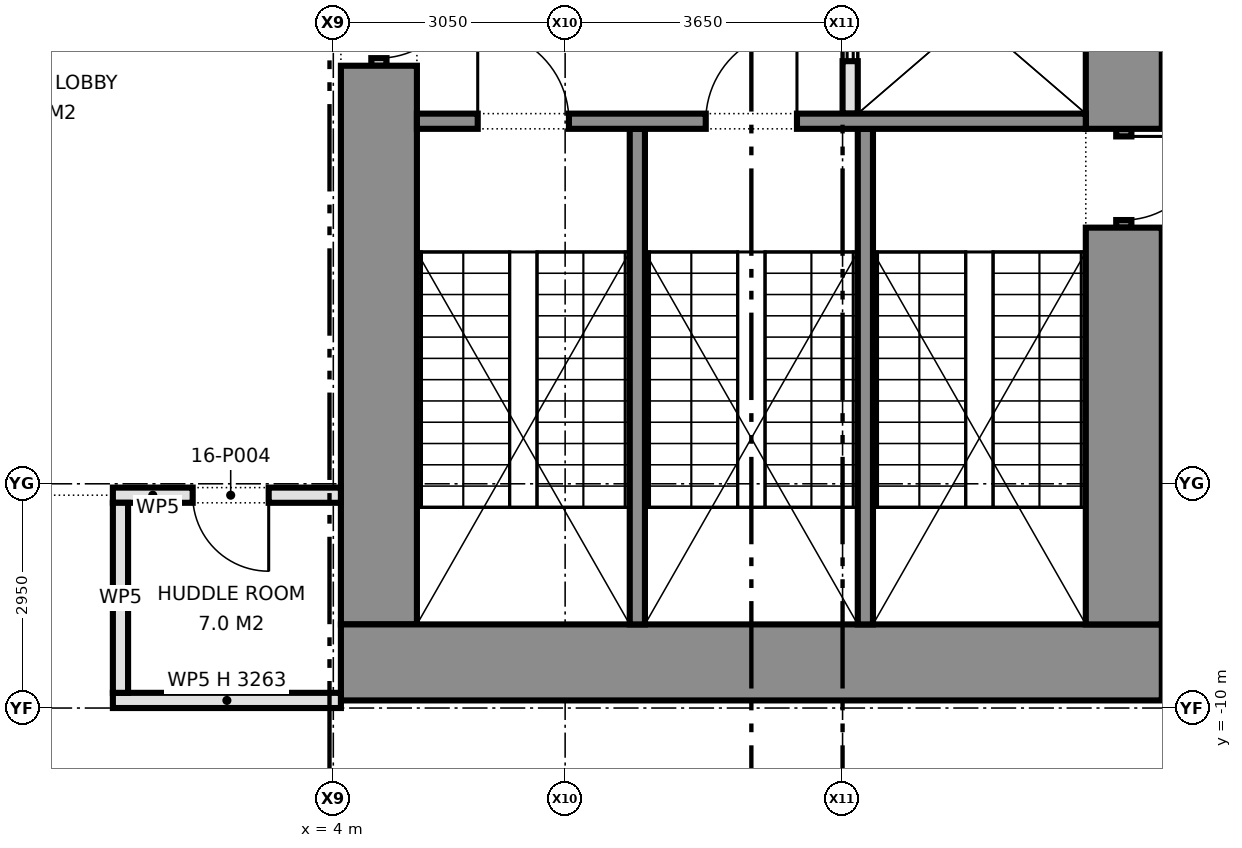
"""IFC4 building model, lengths in metres.
Left out: names, types, materials, properties, quantities, classifications, styles, units other than length and angle.
Written with IfcOpenShell. Run it as: python <this file> out.ifc"""

import sys

from ifc_helpers import new_model, si_unit, direction, frame, frame_2d, origin, place, context, subcontext, project, spatial, rectangle, extrude, element, fill, save


model = new_model("IFC4")
c1 = context("Model", 3, precision=1e-05, world=origin(), true_north=direction((0.0, 1.0)))
c2 = subcontext(c1, "Body", "Model", "MODEL_VIEW")
j1 = project(units=[si_unit("LENGTHUNIT", "METRE"), si_unit("PLANEANGLEUNIT", "RADIAN")], contexts=[c1])
p1 = place(None, origin())
s1 = spatial("IfcSite", under=j1, at=p1, CompositionType="ELEMENT")
p2 = place(p1, origin())
s2 = spatial("IfcBuilding", under=s1, at=p2, CompositionType="ELEMENT")
p3 = place(p2, frame((0.0, 0.0, 73.2)))
s3 = spatial("IfcBuildingStorey", under=s2, at=p3, CompositionType="ELEMENT", Elevation=73.2)
p4 = place(p3, frame((14.9, -9.4, 0.0), z_axis=(0.0, 0.0, 1.0), x_axis=(-1.0, 0.0, 0.0)))
e1 = element("IfcWall", 1, at=p4, inside=s3, PredefinedType="SHEAR", context=c2, shape_type="SweptSolid", body=[
    extrude(rectangle(XDim=10.8, YDim=1.0, at=frame_2d((5.4, 0.0))), origin(), (0.0, 0.0, 1.0), 4.2),
])
p5 = place(p3, frame((14.4, 3.75, 0.0), z_axis=(0.0, 0.0, 1.0), x_axis=(0.0, -1.0, 0.0)))
e2 = element("IfcWall", 2, at=p5, inside=s3, PredefinedType="SHEAR", context=c2, shape_type="SweptSolid", body=[
    extrude(rectangle(XDim=6.13, YDim=1.0, at=frame_2d((3.065, 0.0))), origin(), (0.0, 0.0, 1.0), 4.2),
])
p6 = place(p3, frame((14.4, -2.38, 0.0), z_axis=(0.0, 0.0, 1.0), x_axis=(0.0, -1.0, 0.0)))
e3 = element("IfcWall", 3, at=p6, inside=s3, PredefinedType="SHEAR", context=c2, shape_type="SweptSolid", body=[
    extrude(rectangle(XDim=1.3, YDim=0.2, at=frame_2d((0.65, 0.0))), origin(), (0.0, 0.0, 1.0), 2.4),
])
p7 = place(p6, frame((0.1, 0.0, 0.0)))
e4 = element("IfcOpeningElement", 4, at=p7, cuts=e3, PredefinedType="OPENING", context=c2, shape_type="SweptSolid", body=[
    extrude(rectangle(XDim=1.1, YDim=2.1, at=frame_2d((0.55, 1.05))), frame((0.0, 0.11, 0.0), z_axis=(0.0, -1.0, 0.0), x_axis=(1.0, 0.0, 0.0)), (0.0, 0.0, 1.0), 0.22),
])
p8 = place(p3, frame((14.4, -3.68, 0.0), z_axis=(0.0, 0.0, 1.0), x_axis=(0.0, -1.0, 0.0)))
e5 = element("IfcWall", 5, at=p8, inside=s3, PredefinedType="SHEAR", context=c2, shape_type="SweptSolid", body=[
    extrude(rectangle(XDim=5.22, YDim=1.0, at=frame_2d((2.61, 0.0))), origin(), (0.0, 0.0, 1.0), 4.2),
])
p9 = place(p3, frame((4.6, -0.25, 0.0), z_axis=(0.0, 0.0, 1.0), x_axis=(0.0, -1.0, 0.0)))
e6 = element("IfcWall", 6, at=p9, inside=s3, PredefinedType="PARTITIONING", context=c2, shape_type="SweptSolid", body=[
    extrude(rectangle(XDim=1.3, YDim=0.2, at=frame_2d((0.65, 0.0))), origin(), (0.0, 0.0, 1.0), 2.4),
])
p10 = place(p9, frame((0.1, 0.0, 0.0)))
e7 = element("IfcOpeningElement", 7, at=p10, cuts=e6, PredefinedType="OPENING", context=c2, shape_type="SweptSolid", body=[
    extrude(rectangle(XDim=1.1, YDim=2.1, at=frame_2d((0.55, 1.05))), frame((0.0, 0.11, 0.0), z_axis=(0.0, -1.0, 0.0), x_axis=(1.0, 0.0, 0.0)), (0.0, 0.0, 1.0), 0.22),
])
p11 = place(p3, frame((4.6, -1.55, 0.0), z_axis=(0.0, 0.0, 1.0), x_axis=(0.0, -1.0, 0.0)))
e8 = element("IfcWall", 8, at=p11, inside=s3, PredefinedType="SHEAR", context=c2, shape_type="SweptSolid", body=[
    extrude(rectangle(XDim=7.35, YDim=1.0, at=frame_2d((3.675, 0.0))), origin(), (0.0, 0.0, 1.0), 4.2),
])
p12 = place(p3, frame((10.8, 0.4, 0.0), z_axis=(0.0, 0.0, 1.0), x_axis=(0.0, -1.0, 0.0)))
e9 = element("IfcWall", 9, at=p12, inside=s3, PredefinedType="PARTITIONING", context=c2, shape_type="SweptSolid", body=[
    extrude(rectangle(XDim=2.58, YDim=0.2, at=frame_2d((1.29, 0.0))), origin(), (0.0, 0.0, 1.0), 4.2),
])
p13 = place(p12, frame((0.69, 0.0, 0.0)))
e10 = element("IfcOpeningElement", 10, at=p13, cuts=e9, PredefinedType="OPENING", context=c2, shape_type="SweptSolid", body=[
    extrude(rectangle(XDim=1.2, YDim=2.1, at=frame_2d((0.6, 1.05))), frame((0.0, 0.11, 0.0), z_axis=(0.0, -1.0, 0.0), x_axis=(1.0, 0.0, 0.0)), (0.0, 0.0, 1.0), 0.22),
])
p14 = place(p3, frame((13.9, -2.28, 0.0), z_axis=(0.0, 0.0, 1.0), x_axis=(-1.0, 0.0, 0.0)))
e11 = element("IfcWall", 11, at=p14, inside=s3, PredefinedType="SHEAR", context=c2, shape_type="SweptSolid", body=[
    extrude(rectangle(XDim=8.8, YDim=0.2, at=frame_2d((4.4, 0.0))), origin(), (0.0, 0.0, 1.0), 4.2),
])
p15 = place(p14, frame((3.8, 0.0, 0.0)))
e12 = element("IfcOpeningElement", 12, at=p15, cuts=e11, PredefinedType="OPENING", context=c2, shape_type="SweptSolid", body=[
    extrude(rectangle(XDim=1.2, YDim=2.1, at=frame_2d((0.6, 1.05))), frame((0.0, 0.11, 0.0), z_axis=(0.0, -1.0, 0.0), x_axis=(1.0, 0.0, 0.0)), (0.0, 0.0, 1.0), 0.22),
])
p16 = place(p14, frame((6.8, 0.0, 0.0)))
e13 = element("IfcOpeningElement", 13, at=p16, cuts=e11, PredefinedType="OPENING", context=c2, shape_type="SweptSolid", body=[
    extrude(rectangle(XDim=1.2, YDim=2.1, at=frame_2d((0.6, 1.05))), frame((0.0, 0.11, 0.0), z_axis=(0.0, -1.0, 0.0), x_axis=(1.0, 0.0, 0.0)), (0.0, 0.0, 1.0), 0.22),
])
for number, where, z_axis, x_axis in (
    (14, (11.0, -2.38, 0.0), (0.0, 0.0, 1.0), (0.0, -1.0, 0.0)),
    (15, (8.0, -2.38, 0.0), (0.0, 0.0, 1.0), (0.0, -1.0, 0.0)),
):
    element("IfcWall", number, at=place(p3, frame(where, z_axis=z_axis, x_axis=x_axis)), inside=s3, PredefinedType="SHEAR", context=c2, shape_type="SweptSolid", body=[
        extrude(rectangle(XDim=6.52, YDim=0.2, at=frame_2d((3.26, 0.0))), origin(), (0.0, 0.0, 1.0), 4.2),
    ])
p17 = place(p3, frame((1.1, -9.9, 0.0), z_axis=(0.0, 0.0, 1.0), x_axis=(1.0, 0.0, 0.0)))
e16 = element("IfcWall", 16, at=p17, inside=s3, PredefinedType="PARTITIONING", context=c2, shape_type="SweptSolid", body=[
    extrude(rectangle(XDim=3.0, YDim=0.2, at=frame_2d((1.5, 0.0))), origin(), (0.0, 0.0, 1.0), 3.263),
])
p18 = place(p3, frame((1.1, -7.2, 0.0), z_axis=(0.0, 0.0, 1.0), x_axis=(1.0, 0.0, 0.0)))
e17 = element("IfcWall", 17, at=p18, inside=s3, PredefinedType="PARTITIONING", context=c2, shape_type="SweptSolid", body=[
    extrude(rectangle(XDim=3.0, YDim=0.2, at=frame_2d((1.5, 0.0))), origin(), (0.0, 0.0, 1.0), 4.2),
])
p19 = place(p18, frame((1.05, 0.0, 0.0)))
e18 = element("IfcOpeningElement", 18, at=p19, cuts=e17, PredefinedType="OPENING", context=c2, shape_type="SweptSolid", body=[
    extrude(rectangle(XDim=1.0, YDim=2.1, at=frame_2d((0.5, 1.05))), frame((0.0, 0.11, 0.0), z_axis=(0.0, -1.0, 0.0), x_axis=(1.0, 0.0, 0.0)), (0.0, 0.0, 1.0), 0.22),
])
p20 = place(p3, frame((1.2, -9.8, 0.0), z_axis=(0.0, 0.0, 1.0), x_axis=(0.0, 1.0, 0.0)))
e19 = element("IfcWall", 19, at=p20, inside=s3, PredefinedType="PARTITIONING", context=c2, shape_type="SweptSolid", body=[
    extrude(rectangle(XDim=2.5, YDim=0.2, at=frame_2d((1.25, 0.0))), origin(), (0.0, 0.0, 1.0), 4.2),
])
p21 = place(p7, origin())
e20 = element("IfcDoor", 20, at=p21, inside=s3, OperationType="SINGLE_SWING_LEFT", PredefinedType="DOOR", context=c2, shape_type="SweptSolid", body=[
    extrude(rectangle(XDim=1.1, YDim=2.1, at=frame_2d((0.55, 1.05))), frame((0.0, 0.025, 0.0), z_axis=(0.0, -1.0, 0.0), x_axis=(1.0, 0.0, 0.0)), (0.0, 0.0, 1.0), 0.05),
])
fill(e4, e20)
p22 = place(p10, origin())
e21 = element("IfcDoor", 21, at=p22, inside=s3, OperationType="SINGLE_SWING_LEFT", PredefinedType="DOOR", context=c2, shape_type="SweptSolid", body=[
    extrude(rectangle(XDim=1.1, YDim=2.1, at=frame_2d((0.55, 1.05))), frame((0.0, 0.025, 0.0), z_axis=(0.0, -1.0, 0.0), x_axis=(1.0, 0.0, 0.0)), (0.0, 0.0, 1.0), 0.05),
])
fill(e7, e21)
p23 = place(p13, origin())
e22 = element("IfcDoor", 22, at=p23, inside=s3, OperationType="DOUBLE_DOOR_SLIDING", PredefinedType="DOOR", context=c2, shape_type="SweptSolid", body=[
    extrude(rectangle(XDim=1.2, YDim=2.1, at=frame_2d((0.6, 1.05))), frame((0.0, 0.025, 0.0), z_axis=(0.0, -1.0, 0.0), x_axis=(1.0, 0.0, 0.0)), (0.0, 0.0, 1.0), 0.05),
])
fill(e10, e22)
p24 = place(p15, frame((1.2, 0.0, 0.0), z_axis=(0.0, 0.0, 1.0), x_axis=(-1.0, 0.0, 0.0)))
e23 = element("IfcDoor", 23, at=p24, inside=s3, OperationType="SINGLE_SWING_RIGHT", PredefinedType="DOOR", context=c2, shape_type="SweptSolid", body=[
    extrude(rectangle(XDim=1.2, YDim=2.1, at=frame_2d((0.6, 1.05))), frame((0.0, 0.025, 0.0), z_axis=(0.0, -1.0, 0.0), x_axis=(1.0, 0.0, 0.0)), (0.0, 0.0, 1.0), 0.05),
])
fill(e12, e23)
p25 = place(p16, frame((1.2, 0.0, 0.0), z_axis=(0.0, 0.0, 1.0), x_axis=(-1.0, 0.0, 0.0)))
e24 = element("IfcDoor", 24, at=p25, inside=s3, OperationType="SINGLE_SWING_LEFT", PredefinedType="DOOR", context=c2, shape_type="SweptSolid", body=[
    extrude(rectangle(XDim=1.2, YDim=2.1, at=frame_2d((0.6, 1.05))), frame((0.0, 0.025, 0.0), z_axis=(0.0, -1.0, 0.0), x_axis=(1.0, 0.0, 0.0)), (0.0, 0.0, 1.0), 0.05),
])
fill(e13, e24)
p26 = place(p19, frame((1.0, 0.0, 0.0), z_axis=(0.0, 0.0, 1.0), x_axis=(-1.0, 0.0, 0.0)))
e25 = element("IfcDoor", 25, at=p26, inside=s3, OperationType="SINGLE_SWING_LEFT", PredefinedType="DOOR", context=c2, shape_type="SweptSolid", body=[
    extrude(rectangle(XDim=1.0, YDim=2.1, at=frame_2d((0.5, 1.05))), frame((0.0, 0.025, 0.0), z_axis=(0.0, -1.0, 0.0), x_axis=(1.0, 0.0, 0.0)), (0.0, 0.0, 1.0), 0.05),
])
fill(e18, e25)
save(model, sys.argv[1])
